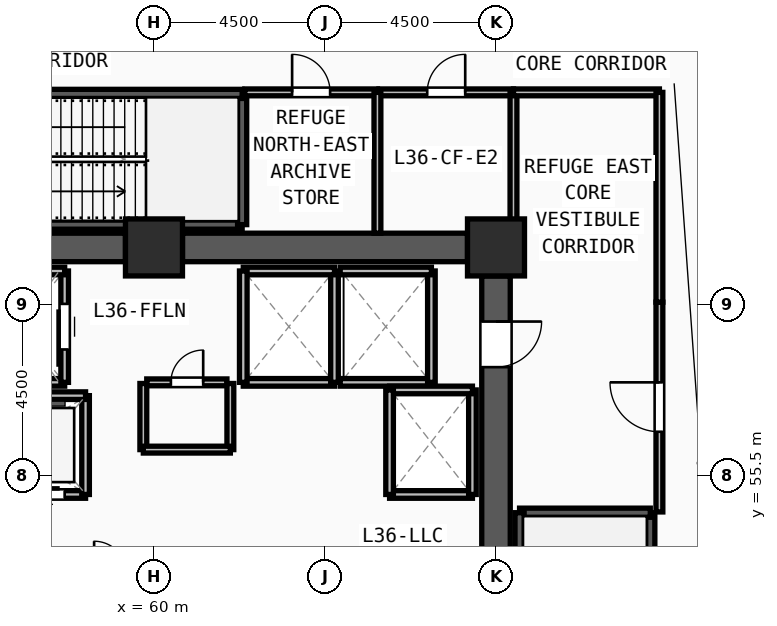
"""IFC4 building model, lengths in metres.
Left out: names, types, materials, properties, quantities, classifications, styles, units other than length and angle.
Written with IfcOpenShell. Run it as: python <this file> out.ifc"""

import sys

from ifc_helpers import new_model, si_unit, direction, frame, frame_2d, origin, origin_2d, place, context, subcontext, project, spatial, rectangle, extrude, source, transform, mapped, element, fill, save


model = new_model("IFC4")
c1 = context("Model", 3, precision=1e-05, world=origin(), true_north=direction((0.0, 1.0)))
c2 = subcontext(c1, "Body", "Model", "MODEL_VIEW")
j1 = project(units=[si_unit("LENGTHUNIT", "METRE"), si_unit("PLANEANGLEUNIT", "RADIAN")], contexts=[c1])
p1 = place(None, origin())
s1 = spatial("IfcSite", under=j1, at=p1, CompositionType="ELEMENT")
p2 = place(p1, origin())
s2 = spatial("IfcBuilding", under=s1, at=p2, CompositionType="ELEMENT")
p3 = place(p2, frame((0.0, 0.0, 139.5)))
s3 = spatial("IfcBuildingStorey", under=s2, at=p3, CompositionType="ELEMENT", Elevation=139.5)
m1 = source(origin(), c2, "Body", "SweptSolid", [
    extrude(rectangle(XDim=1.5, YDim=1.5, at=origin_2d()), origin(), (0.0, 0.0, 1.0), 4.5),
])
for number, where, z_axis, x_axis in (
    (1, (69.0, 61.5, 0.0), (0.0, 0.0, 1.0), (1.0, 0.0, 0.0)),
    (2, (60.0, 61.5, 0.0), (0.0, 0.0, 1.0), (1.0, 0.0, 0.0)),
):
    element("IfcColumn", number, at=place(p3, frame(where, z_axis=z_axis, x_axis=x_axis)), inside=s3, PredefinedType="COLUMN", context=c2, shape_type="MappedRepresentation", body=[
        mapped(m1, transform((0.0, 0.0, 0.0), x_axis=(1.0, 0.0, 0.0), y_axis=(0.0, 1.0, 0.0), z_axis=(0.0, 0.0, 1.0), scale=1.0)),
    ])
for number, where, z_axis, x_axis in (
    (3, (51.75, 61.5, 0.0), (0.0, 0.0, 1.0), (1.0, 0.0, 0.0)),
    (4, (60.75, 61.5, 0.0), (0.0, 0.0, 1.0), (1.0, 0.0, 0.0)),
):
    element("IfcWall", number, at=place(p3, frame(where, z_axis=z_axis, x_axis=x_axis)), inside=s3, PredefinedType="SHEAR", context=c2, shape_type="SweptSolid", body=[
        extrude(rectangle(XDim=7.5, YDim=0.75, at=frame_2d((3.75, 0.0))), origin(), (0.0, 0.0, 1.0), 4.32),
    ])
p4 = place(p3, frame((69.0, 60.75, 0.0), z_axis=(0.0, 0.0, 1.0), x_axis=(0.0, -1.0, 0.0)))
e5 = element("IfcWall", 5, at=p4, inside=s3, PredefinedType="SHEAR", context=c2, shape_type="SweptSolid", body=[
    extrude(rectangle(XDim=13.5, YDim=0.75, at=frame_2d((6.75, 0.0))), origin(), (0.0, 0.0, 1.0), 4.32),
])
m2 = source(origin(), c2, "Body", "SweptSolid", [
    extrude(rectangle(XDim=1.2, YDim=2.2, at=frame_2d((0.6, 1.1))), frame((0.0, 0.385, 0.0), z_axis=(0.0, -1.0, 0.0), x_axis=(1.0, 0.0, 0.0)), (0.0, 0.0, 1.0), 0.77),
])
p5 = place(p4, frame((1.2, 0.0, 0.0)))
e6 = element("IfcOpeningElement", 6, at=p5, cuts=e5, PredefinedType="OPENING", context=c2, shape_type="MappedRepresentation", body=[
    mapped(m2, transform((0.0, 0.0, 0.0), x_axis=(1.0, 0.0, 0.0), y_axis=(0.0, 1.0, 0.0), z_axis=(0.0, 0.0, 1.0), scale=1.0)),
])
p6 = place(p3, frame((73.06, 46.7, 0.0), z_axis=(0.0, 0.0, 1.0), x_axis=(0.0, 1.0, 0.0)))
e7 = element("IfcWall", 7, at=p6, inside=s3, PredefinedType="SOLIDWALL", context=c2, shape_type="SweptSolid", body=[
    extrude(rectangle(XDim=7.82, YDim=0.24, at=frame_2d((3.91, 0.0))), origin(), (0.0, 0.0, 1.0), 4.32),
])
m3 = source(origin(), c2, "Body", "SweptSolid", [
    extrude(rectangle(XDim=1.2, YDim=2.2, at=frame_2d((0.6, 1.1))), frame((0.0, 0.13, 0.0), z_axis=(0.0, -1.0, 0.0), x_axis=(1.0, 0.0, 0.0)), (0.0, 0.0, 1.0), 0.26),
])
p7 = place(p6, frame((0.32, 0.0, 0.0)))
e8 = element("IfcOpeningElement", 8, at=p7, cuts=e7, PredefinedType="OPENING", context=c2, shape_type="MappedRepresentation", body=[
    mapped(m3, transform((0.0, 0.0, 0.0), x_axis=(1.0, 0.0, 0.0), y_axis=(0.0, 1.0, 0.0), z_axis=(0.0, 0.0, 1.0), scale=1.0)),
])
p8 = place(p3, frame((73.06, 54.52, 0.0), z_axis=(0.0, 0.0, 1.0), x_axis=(-1.0, 0.0, 0.0)))
e9 = element("IfcWall", 9, at=p8, inside=s3, PredefinedType="SOLIDWALL", context=c2, shape_type="SweptSolid", body=[
    extrude(rectangle(XDim=3.44, YDim=0.24, at=frame_2d((1.72, 0.0))), origin(), (0.0, 0.0, 1.0), 4.32),
])
for number, where, z_axis, x_axis in (
    (10, (69.62, 54.52, 0.0), (0.0, 0.0, 1.0), (0.0, -1.0, 0.0)),
    (11, (54.5, 62.1, 0.0), (0.0, 0.0, 1.0), (1.0, 0.0, 0.0)),
):
    element("IfcWall", number, at=place(p3, frame(where, z_axis=z_axis, x_axis=x_axis)), inside=s3, PredefinedType="SOLIDWALL", context=c2, shape_type="SweptSolid", body=[
        extrude(rectangle(XDim=7.82, YDim=0.24, at=frame_2d((3.91, 0.0))), origin(), (0.0, 0.0, 1.0), 4.32),
    ])
p9 = place(p3, frame((62.32, 62.1, 0.0), z_axis=(0.0, 0.0, 1.0), x_axis=(0.0, 1.0, 0.0)))
e12 = element("IfcWall", 12, at=p9, inside=s3, PredefinedType="SOLIDWALL", context=c2, shape_type="SweptSolid", body=[
    extrude(rectangle(XDim=3.44, YDim=0.24, at=frame_2d((1.72, 0.0))), origin(), (0.0, 0.0, 1.0), 4.32),
])
p10 = place(p3, frame((62.32, 65.54, 0.0), z_axis=(0.0, 0.0, 1.0), x_axis=(-1.0, 0.0, 0.0)))
e13 = element("IfcWall", 13, at=p10, inside=s3, PredefinedType="SOLIDWALL", context=c2, shape_type="SweptSolid", body=[
    extrude(rectangle(XDim=7.82, YDim=0.24, at=frame_2d((3.91, 0.0))), origin(), (0.0, 0.0, 1.0), 4.32),
])
p11 = place(p10, frame((6.3, 0.0, 0.0)))
e14 = element("IfcOpeningElement", 14, at=p11, cuts=e13, PredefinedType="OPENING", context=c2, shape_type="MappedRepresentation", body=[
    mapped(m3, transform((0.0, 0.0, 0.0), x_axis=(1.0, 0.0, 0.0), y_axis=(0.0, 1.0, 0.0), z_axis=(0.0, 0.0, 1.0), scale=1.0)),
])
p12 = place(p3, frame((55.25, 57.95, 0.0), z_axis=(0.0, 0.0, 1.0), x_axis=(1.0, 0.0, 0.0)))
e15 = element("IfcWall", 15, at=p12, inside=s3, PredefinedType="SOLIDWALL", context=c2, shape_type="SweptSolid", body=[
    extrude(rectangle(XDim=2.4, YDim=0.2, at=frame_2d((1.2, 0.0))), origin(), (0.0, 0.0, 1.0), 4.32),
])
p13 = place(p3, frame((57.65, 57.95, 0.0), z_axis=(0.0, 0.0, 1.0), x_axis=(0.0, 1.0, 0.0)))
e16 = element("IfcWall", 16, at=p13, inside=s3, PredefinedType="SOLIDWALL", context=c2, shape_type="SweptSolid", body=[
    extrude(rectangle(XDim=2.93, YDim=0.2, at=frame_2d((1.465, 0.0))), origin(), (0.0, 0.0, 1.0), 4.32),
])
m4 = source(origin(), c2, "Body", "SweptSolid", [
    extrude(rectangle(XDim=1.2, YDim=2.3, at=frame_2d((0.6, 1.15))), frame((0.0, 0.11, 0.0), z_axis=(0.0, -1.0, 0.0), x_axis=(1.0, 0.0, 0.0)), (0.0, 0.0, 1.0), 0.22),
])
p14 = place(p13, frame((0.865, 0.0, 0.0)))
e17 = element("IfcOpeningElement", 17, at=p14, cuts=e16, PredefinedType="OPENING", context=c2, shape_type="MappedRepresentation", body=[
    mapped(m4, transform((0.0, 0.0, 0.0), x_axis=(1.0, 0.0, 0.0), y_axis=(0.0, 1.0, 0.0), z_axis=(0.0, 0.0, 1.0), scale=1.0)),
])
for number, where, z_axis, x_axis in (
    (18, (57.65, 60.88, 0.0), (0.0, 0.0, 1.0), (-1.0, 0.0, 0.0)),
    (19, (62.35, 57.95, 0.0), (0.0, 0.0, 1.0), (1.0, 0.0, 0.0)),
):
    element("IfcWall", number, at=place(p3, frame(where, z_axis=z_axis, x_axis=x_axis)), inside=s3, PredefinedType="SOLIDWALL", context=c2, shape_type="SweptSolid", body=[
        extrude(rectangle(XDim=2.4, YDim=0.2, at=frame_2d((1.2, 0.0))), origin(), (0.0, 0.0, 1.0), 4.32),
    ])
p15 = place(p3, frame((64.75, 57.95, 0.0), z_axis=(0.0, 0.0, 1.0), x_axis=(0.0, 1.0, 0.0)))
e20 = element("IfcWall", 20, at=p15, inside=s3, PredefinedType="SOLIDWALL", context=c2, shape_type="SweptSolid", body=[
    extrude(rectangle(XDim=2.93, YDim=0.2, at=frame_2d((1.465, 0.0))), origin(), (0.0, 0.0, 1.0), 4.32),
])
p16 = place(p3, frame((64.75, 60.88, 0.0), z_axis=(0.0, 0.0, 1.0), x_axis=(-1.0, 0.0, 0.0)))
e21 = element("IfcWall", 21, at=p16, inside=s3, PredefinedType="SOLIDWALL", context=c2, shape_type="SweptSolid", body=[
    extrude(rectangle(XDim=2.4, YDim=0.2, at=frame_2d((1.2, 0.0))), origin(), (0.0, 0.0, 1.0), 4.32),
])
p17 = place(p3, frame((62.35, 60.88, 0.0), z_axis=(0.0, 0.0, 1.0), x_axis=(0.0, -1.0, 0.0)))
e22 = element("IfcWall", 22, at=p17, inside=s3, PredefinedType="SOLIDWALL", context=c2, shape_type="SweptSolid", body=[
    extrude(rectangle(XDim=2.93, YDim=0.2, at=frame_2d((1.465, 0.0))), origin(), (0.0, 0.0, 1.0), 4.32),
])
p18 = place(p3, frame((64.9, 57.95, 0.0), z_axis=(0.0, 0.0, 1.0), x_axis=(1.0, 0.0, 0.0)))
e23 = element("IfcWall", 23, at=p18, inside=s3, PredefinedType="SOLIDWALL", context=c2, shape_type="SweptSolid", body=[
    extrude(rectangle(XDim=2.4, YDim=0.2, at=frame_2d((1.2, 0.0))), origin(), (0.0, 0.0, 1.0), 4.32),
])
p19 = place(p3, frame((67.3, 57.95, 0.0), z_axis=(0.0, 0.0, 1.0), x_axis=(0.0, 1.0, 0.0)))
e24 = element("IfcWall", 24, at=p19, inside=s3, PredefinedType="SOLIDWALL", context=c2, shape_type="SweptSolid", body=[
    extrude(rectangle(XDim=2.93, YDim=0.2, at=frame_2d((1.465, 0.0))), origin(), (0.0, 0.0, 1.0), 4.32),
])
p20 = place(p3, frame((67.3, 60.88, 0.0), z_axis=(0.0, 0.0, 1.0), x_axis=(-1.0, 0.0, 0.0)))
e25 = element("IfcWall", 25, at=p20, inside=s3, PredefinedType="SOLIDWALL", context=c2, shape_type="SweptSolid", body=[
    extrude(rectangle(XDim=2.4, YDim=0.2, at=frame_2d((1.2, 0.0))), origin(), (0.0, 0.0, 1.0), 4.32),
])
p21 = place(p3, frame((66.2, 55.0, 0.0), z_axis=(0.0, 0.0, 1.0), x_axis=(1.0, 0.0, 0.0)))
e26 = element("IfcWall", 26, at=p21, inside=s3, PredefinedType="SOLIDWALL", context=c2, shape_type="SweptSolid", body=[
    extrude(rectangle(XDim=2.18, YDim=0.2, at=frame_2d((1.09, 0.0))), origin(), (0.0, 0.0, 1.0), 4.32),
])
p22 = place(p3, frame((68.38, 55.0, 0.0), z_axis=(0.0, 0.0, 1.0), x_axis=(0.0, 1.0, 0.0)))
e27 = element("IfcWall", 27, at=p22, inside=s3, PredefinedType="SOLIDWALL", context=c2, shape_type="SweptSolid", body=[
    extrude(rectangle(XDim=2.75, YDim=0.2, at=frame_2d((1.375, 0.0))), origin(), (0.0, 0.0, 1.0), 4.32),
])
p23 = place(p3, frame((68.38, 57.75, 0.0), z_axis=(0.0, 0.0, 1.0), x_axis=(-1.0, 0.0, 0.0)))
e28 = element("IfcWall", 28, at=p23, inside=s3, PredefinedType="SOLIDWALL", context=c2, shape_type="SweptSolid", body=[
    extrude(rectangle(XDim=2.18, YDim=0.2, at=frame_2d((1.09, 0.0))), origin(), (0.0, 0.0, 1.0), 4.32),
])
p24 = place(p3, frame((66.2, 57.75, 0.0), z_axis=(0.0, 0.0, 1.0), x_axis=(0.0, -1.0, 0.0)))
e29 = element("IfcWall", 29, at=p24, inside=s3, PredefinedType="SOLIDWALL", context=c2, shape_type="SweptSolid", body=[
    extrude(rectangle(XDim=2.75, YDim=0.2, at=frame_2d((1.375, 0.0))), origin(), (0.0, 0.0, 1.0), 4.32),
])
p25 = place(p3, frame((56.0, 55.0, 0.0), z_axis=(0.0, 0.0, 1.0), x_axis=(1.0, 0.0, 0.0)))
e30 = element("IfcWall", 30, at=p25, inside=s3, PredefinedType="SOLIDWALL", context=c2, shape_type="SweptSolid", body=[
    extrude(rectangle(XDim=2.2, YDim=0.2, at=frame_2d((1.1, 0.0))), origin(), (0.0, 0.0, 1.0), 4.32),
])
m5 = source(origin(), c2, "Body", "SweptSolid", [
    extrude(rectangle(XDim=1.1, YDim=2.2, at=frame_2d((0.55, 1.1))), frame((0.0, 0.11, 0.0), z_axis=(0.0, -1.0, 0.0), x_axis=(1.0, 0.0, 0.0)), (0.0, 0.0, 1.0), 0.22),
])
p26 = place(p25, frame((0.55, 0.0, 0.0)))
e31 = element("IfcOpeningElement", 31, at=p26, cuts=e30, PredefinedType="OPENING", context=c2, shape_type="MappedRepresentation", body=[
    mapped(m5, transform((0.0, 0.0, 0.0), x_axis=(1.0, 0.0, 0.0), y_axis=(0.0, 1.0, 0.0), z_axis=(0.0, 0.0, 1.0), scale=1.0)),
])
p27 = place(p3, frame((58.2, 55.0, 0.0), z_axis=(0.0, 0.0, 1.0), x_axis=(0.0, 1.0, 0.0)))
e32 = element("IfcWall", 32, at=p27, inside=s3, PredefinedType="SOLIDWALL", context=c2, shape_type="SweptSolid", body=[
    extrude(rectangle(XDim=2.6, YDim=0.2, at=frame_2d((1.3, 0.0))), origin(), (0.0, 0.0, 1.0), 4.32),
])
p28 = place(p3, frame((58.2, 57.6, 0.0), z_axis=(0.0, 0.0, 1.0), x_axis=(-1.0, 0.0, 0.0)))
e33 = element("IfcWall", 33, at=p28, inside=s3, PredefinedType="SOLIDWALL", context=c2, shape_type="SweptSolid", body=[
    extrude(rectangle(XDim=2.2, YDim=0.2, at=frame_2d((1.1, 0.0))), origin(), (0.0, 0.0, 1.0), 4.32),
])
p29 = place(p3, frame((59.81, 57.95, 0.0), z_axis=(0.0, 0.0, 1.0), x_axis=(1.0, 0.0, 0.0)))
e34 = element("IfcWall", 34, at=p29, inside=s3, PredefinedType="PARTITIONING", context=c2, shape_type="SweptSolid", body=[
    extrude(rectangle(XDim=2.11, YDim=0.18, at=frame_2d((1.055, 0.0))), origin(), (0.0, 0.0, 1.0), 4.32),
])
m6 = source(origin(), c2, "Body", "SweptSolid", [
    extrude(rectangle(XDim=0.85, YDim=2.1, at=frame_2d((0.425, 1.05))), frame((0.0, 0.1, 0.0), z_axis=(0.0, -1.0, 0.0), x_axis=(1.0, 0.0, 0.0)), (0.0, 0.0, 1.0), 0.2),
])
p30 = place(p29, frame((0.635, 0.0, 0.0)))
e35 = element("IfcOpeningElement", 35, at=p30, cuts=e34, PredefinedType="OPENING", context=c2, shape_type="MappedRepresentation", body=[
    mapped(m6, transform((0.0, 0.0, 0.0), x_axis=(1.0, 0.0, 0.0), y_axis=(0.0, 1.0, 0.0), z_axis=(0.0, 0.0, 1.0), scale=1.0)),
])
p31 = place(p3, frame((62.39, 65.58, 0.0), z_axis=(0.0, 0.0, 1.0), x_axis=(1.0, 0.0, 0.0)))
e36 = element("IfcWall", 36, at=p31, inside=s3, PredefinedType="PARTITIONING", context=c2, shape_type="SweptSolid", body=[
    extrude(rectangle(XDim=3.49, YDim=0.18, at=frame_2d((1.745, 0.0))), origin(), (0.0, 0.0, 1.0), 4.32),
])
m7 = source(origin(), c2, "Body", "SweptSolid", [
    extrude(rectangle(XDim=1.0, YDim=2.2, at=frame_2d((0.5, 1.1))), frame((0.0, 0.1, 0.0), z_axis=(0.0, -1.0, 0.0), x_axis=(1.0, 0.0, 0.0)), (0.0, 0.0, 1.0), 0.2),
])
p32 = place(p31, frame((1.245, 0.0, 0.0)))
e37 = element("IfcOpeningElement", 37, at=p32, cuts=e36, PredefinedType="OPENING", context=c2, shape_type="MappedRepresentation", body=[
    mapped(m7, transform((0.0, 0.0, 0.0), x_axis=(1.0, 0.0, 0.0), y_axis=(0.0, 1.0, 0.0), z_axis=(0.0, 0.0, 1.0), scale=1.0)),
])
p33 = place(p3, frame((65.92, 65.58, 0.0), z_axis=(0.0, 0.0, 1.0), x_axis=(1.0, 0.0, 0.0)))
e38 = element("IfcWall", 38, at=p33, inside=s3, PredefinedType="PARTITIONING", context=c2, shape_type="SweptSolid", body=[
    extrude(rectangle(XDim=3.54, YDim=0.18, at=frame_2d((1.77, 0.0))), origin(), (0.0, 0.0, 1.0), 4.32),
])
p34 = place(p33, frame((1.27, 0.0, 0.0)))
e39 = element("IfcOpeningElement", 39, at=p34, cuts=e38, PredefinedType="OPENING", context=c2, shape_type="MappedRepresentation", body=[
    mapped(m7, transform((0.0, 0.0, 0.0), x_axis=(1.0, 0.0, 0.0), y_axis=(0.0, 1.0, 0.0), z_axis=(0.0, 0.0, 1.0), scale=1.0)),
])
p35 = place(p3, frame((73.3, 54.54, 0.0), z_axis=(0.0, 0.0, 1.0), x_axis=(0.0, 1.0, 0.0)))
e40 = element("IfcWall", 40, at=p35, inside=s3, PredefinedType="PARTITIONING", context=c2, shape_type="SweptSolid", body=[
    extrude(rectangle(XDim=5.52, YDim=0.18, at=frame_2d((2.76, 0.0))), origin(), (0.0, 0.0, 1.0), 4.32),
])
m8 = source(origin(), c2, "Body", "SweptSolid", [
    extrude(rectangle(XDim=1.3, YDim=2.2, at=frame_2d((0.65, 1.1))), frame((0.0, 0.1, 0.0), z_axis=(0.0, -1.0, 0.0), x_axis=(1.0, 0.0, 0.0)), (0.0, 0.0, 1.0), 0.2),
])
p36 = place(p35, frame((2.11, 0.0, 0.0)))
e41 = element("IfcOpeningElement", 41, at=p36, cuts=e40, PredefinedType="OPENING", context=c2, shape_type="MappedRepresentation", body=[
    mapped(m8, transform((0.0, 0.0, 0.0), x_axis=(1.0, 0.0, 0.0), y_axis=(0.0, 1.0, 0.0), z_axis=(0.0, 0.0, 1.0), scale=1.0)),
])
for number, where, z_axis, x_axis in (
    (42, (59.72, 56.18, 0.0), (0.0, 0.0, 1.0), (0.0, 1.0, 0.0)),
    (43, (62.01, 56.18, 0.0), (0.0, 0.0, 1.0), (0.0, 1.0, 0.0)),
):
    element("IfcWall", number, at=place(p3, frame(where, z_axis=z_axis, x_axis=x_axis)), inside=s3, PredefinedType="PARTITIONING", context=c2, shape_type="SweptSolid", body=[
        extrude(rectangle(XDim=1.74, YDim=0.18, at=frame_2d((0.87, 0.0))), origin(), (0.0, 0.0, 1.0), 4.32),
    ])
p37 = place(p3, frame((59.72, 56.18, 0.0), z_axis=(0.0, 0.0, 1.0), x_axis=(1.0, 0.0, 0.0)))
e44 = element("IfcWall", 44, at=p37, inside=s3, PredefinedType="PARTITIONING", context=c2, shape_type="SweptSolid", body=[
    extrude(rectangle(XDim=2.29, YDim=0.18, at=frame_2d((1.145, 0.0))), origin(), (0.0, 0.0, 1.0), 4.32),
])
p38 = place(p3, frame((65.88, 61.875, 0.0), z_axis=(0.0, 0.0, 1.0), x_axis=(0.0, 1.0, 0.0)))
e45 = element("IfcWall", 45, at=p38, inside=s3, PredefinedType="PARTITIONING", context=c2, shape_type="SweptSolid", body=[
    extrude(rectangle(XDim=3.705, YDim=0.18, at=frame_2d((1.853, 0.0))), origin(), (0.0, 0.0, 1.0), 4.32),
])
p39 = place(p3, frame((69.46, 61.95, 0.0), z_axis=(0.0, 0.0, 1.0), x_axis=(0.0, 1.0, 0.0)))
e46 = element("IfcWall", 46, at=p39, inside=s3, PredefinedType="PARTITIONING", context=c2, shape_type="SweptSolid", body=[
    extrude(rectangle(XDim=3.63, YDim=0.18, at=frame_2d((1.815, 0.0))), origin(), (0.0, 0.0, 1.0), 4.32),
])
p40 = place(p3, frame((69.46, 65.58, 0.0), z_axis=(0.0, 0.0, 1.0), x_axis=(1.0, 0.0, 0.0)))
e47 = element("IfcWall", 47, at=p40, inside=s3, PredefinedType="PARTITIONING", context=c2, shape_type="SweptSolid", body=[
    extrude(rectangle(XDim=3.84, YDim=0.18, at=frame_2d((1.92, 0.0))), origin(), (0.0, 0.0, 1.0), 4.32),
])
p41 = place(p3, frame((73.3, 60.06, 0.0), z_axis=(0.0, 0.0, 1.0), x_axis=(0.0, 1.0, 0.0)))
e48 = element("IfcWall", 48, at=p41, inside=s3, PredefinedType="PARTITIONING", context=c2, shape_type="SweptSolid", body=[
    extrude(rectangle(XDim=5.52, YDim=0.18, at=frame_2d((2.76, 0.0))), origin(), (0.0, 0.0, 1.0), 4.32),
])
m9 = source(origin(), c2, "Body", "SweptSolid", [
    extrude(rectangle(XDim=1.2, YDim=2.2, at=frame_2d((0.6, 1.1))), frame((0.0, 0.025, 0.0), z_axis=(0.0, -1.0, 0.0), x_axis=(1.0, 0.0, 0.0)), (0.0, 0.0, 1.0), 0.05),
])
p42 = place(p5, origin())
e49 = element("IfcDoor", 49, at=p42, inside=s3, OperationType="SINGLE_SWING_LEFT", PredefinedType="DOOR", context=c2, shape_type="MappedRepresentation", body=[
    mapped(m9, transform((0.0, 0.0, 0.0), x_axis=(1.0, 0.0, 0.0), y_axis=(0.0, 1.0, 0.0), z_axis=(0.0, 0.0, 1.0), scale=1.0)),
])
fill(e6, e49)
m10 = source(origin(), c2, "Body", "SweptSolid", [
    extrude(rectangle(XDim=1.2, YDim=2.3, at=frame_2d((0.6, 1.15))), frame((0.0, 0.025, 0.0), z_axis=(0.0, -1.0, 0.0), x_axis=(1.0, 0.0, 0.0)), (0.0, 0.0, 1.0), 0.05),
])
p43 = place(p14, origin())
e50 = element("IfcDoor", 50, at=p43, inside=s3, OperationType="SLIDING_TO_LEFT", PredefinedType="DOOR", context=c2, shape_type="MappedRepresentation", body=[
    mapped(m10, transform((0.0, 0.0, 0.0), x_axis=(1.0, 0.0, 0.0), y_axis=(0.0, 1.0, 0.0), z_axis=(0.0, 0.0, 1.0), scale=1.0)),
])
fill(e17, e50)
m11 = source(origin(), c2, "Body", "SweptSolid", [
    extrude(rectangle(XDim=1.1, YDim=2.2, at=frame_2d((0.55, 1.1))), frame((0.0, 0.025, 0.0), z_axis=(0.0, -1.0, 0.0), x_axis=(1.0, 0.0, 0.0)), (0.0, 0.0, 1.0), 0.05),
])
p44 = place(p26, origin())
e51 = element("IfcDoor", 51, at=p44, inside=s3, OperationType="SLIDING_TO_LEFT", PredefinedType="DOOR", context=c2, shape_type="MappedRepresentation", body=[
    mapped(m11, transform((0.0, 0.0, 0.0), x_axis=(1.0, 0.0, 0.0), y_axis=(0.0, 1.0, 0.0), z_axis=(0.0, 0.0, 1.0), scale=1.0)),
])
fill(e31, e51)
m12 = source(origin(), c2, "Body", "SweptSolid", [
    extrude(rectangle(XDim=0.85, YDim=2.1, at=frame_2d((0.425, 1.05))), frame((0.0, 0.025, 0.0), z_axis=(0.0, -1.0, 0.0), x_axis=(1.0, 0.0, 0.0)), (0.0, 0.0, 1.0), 0.05),
])
p45 = place(p30, origin())
e52 = element("IfcDoor", 52, at=p45, inside=s3, OperationType="SINGLE_SWING_RIGHT", PredefinedType="DOOR", context=c2, shape_type="MappedRepresentation", body=[
    mapped(m12, transform((0.0, 0.0, 0.0), x_axis=(1.0, 0.0, 0.0), y_axis=(0.0, 1.0, 0.0), z_axis=(0.0, 0.0, 1.0), scale=1.0)),
])
fill(e35, e52)
m13 = source(origin(), c2, "Body", "SweptSolid", [
    extrude(rectangle(XDim=1.0, YDim=2.2, at=frame_2d((0.5, 1.1))), frame((0.0, 0.025, 0.0), z_axis=(0.0, -1.0, 0.0), x_axis=(1.0, 0.0, 0.0)), (0.0, 0.0, 1.0), 0.05),
])
p46 = place(p32, origin())
e53 = element("IfcDoor", 53, at=p46, inside=s3, OperationType="SINGLE_SWING_LEFT", PredefinedType="DOOR", context=c2, shape_type="MappedRepresentation", body=[
    mapped(m13, transform((0.0, 0.0, 0.0), x_axis=(1.0, 0.0, 0.0), y_axis=(0.0, 1.0, 0.0), z_axis=(0.0, 0.0, 1.0), scale=1.0)),
])
fill(e37, e53)
p47 = place(p34, origin())
e54 = element("IfcDoor", 54, at=p47, inside=s3, OperationType="SINGLE_SWING_RIGHT", PredefinedType="DOOR", context=c2, shape_type="MappedRepresentation", body=[
    mapped(m13, transform((0.0, 0.0, 0.0), x_axis=(1.0, 0.0, 0.0), y_axis=(0.0, 1.0, 0.0), z_axis=(0.0, 0.0, 1.0), scale=1.0)),
])
fill(e39, e54)
m14 = source(origin(), c2, "Body", "SweptSolid", [
    extrude(rectangle(XDim=1.3, YDim=2.2, at=frame_2d((0.65, 1.1))), frame((0.0, 0.025, 0.0), z_axis=(0.0, -1.0, 0.0), x_axis=(1.0, 0.0, 0.0)), (0.0, 0.0, 1.0), 0.05),
])
p48 = place(p36, origin())
e55 = element("IfcDoor", 55, at=p48, inside=s3, OperationType="SINGLE_SWING_RIGHT", PredefinedType="DOOR", context=c2, shape_type="MappedRepresentation", body=[
    mapped(m14, transform((0.0, 0.0, 0.0), x_axis=(1.0, 0.0, 0.0), y_axis=(0.0, 1.0, 0.0), z_axis=(0.0, 0.0, 1.0), scale=1.0)),
])
fill(e41, e55)
save(model, sys.argv[1])
